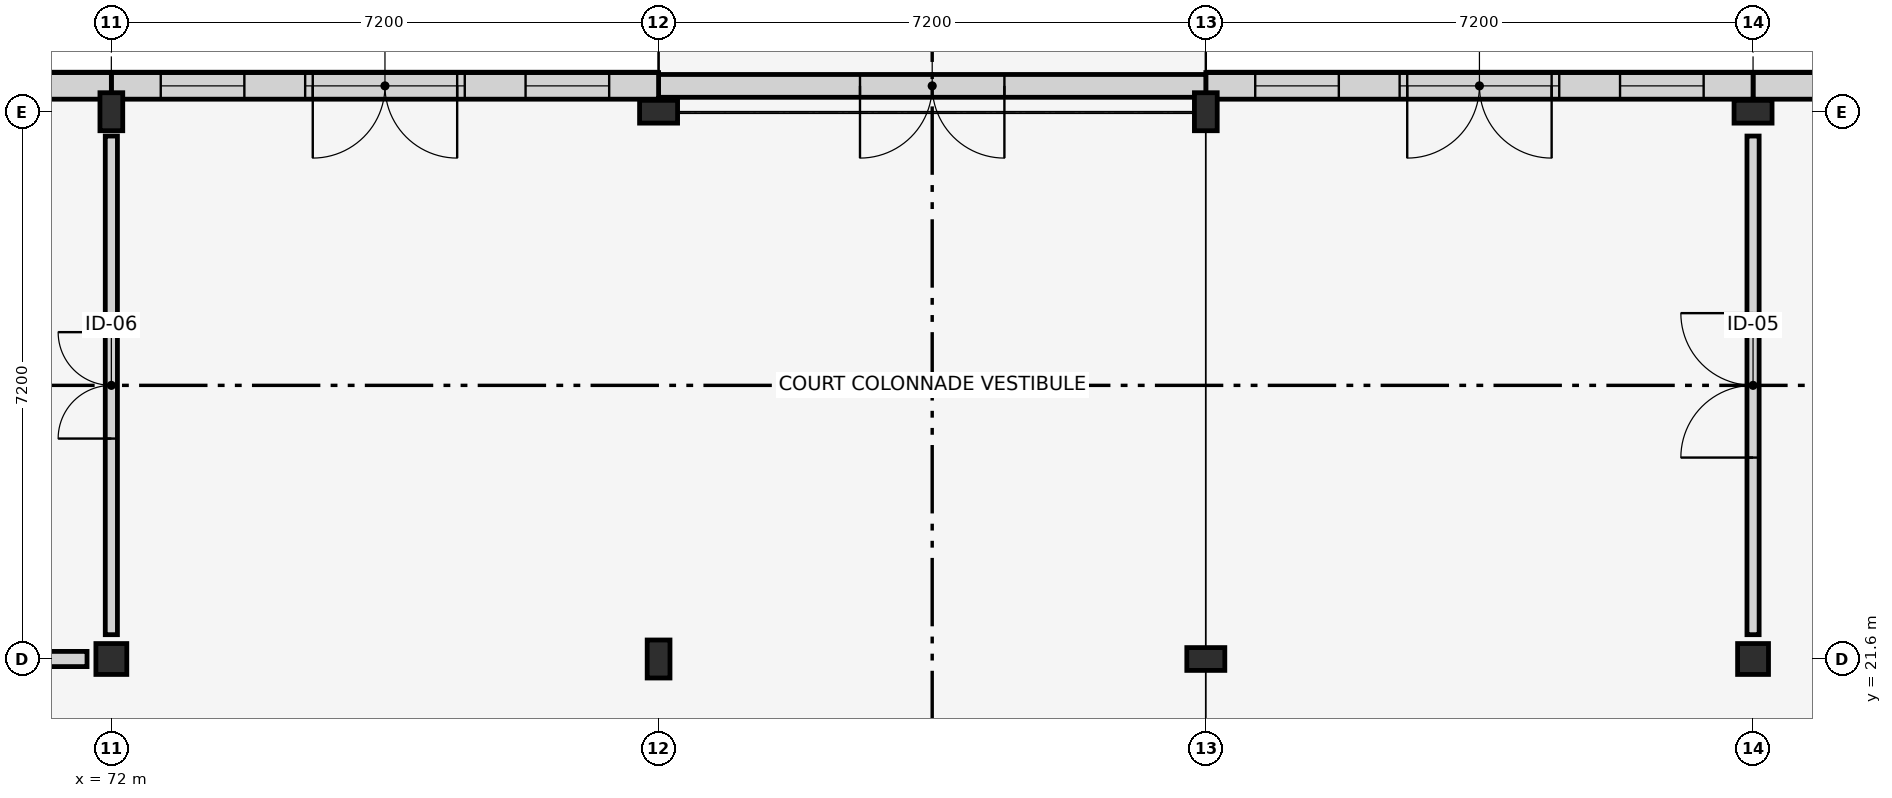
"""IFC4 building model, lengths in metres.
Left out: names, types, materials, properties, quantities, classifications, styles, units other than length and angle.
Written with IfcOpenShell. Run it as: python <this file> out.ifc"""

import sys

from ifc_helpers import new_model, si_unit, direction, frame, frame_2d, origin, origin_2d, place, context, subcontext, project, spatial, rectangle, hollow_circle, i_section, extrude, element, fill, save


model = new_model("IFC4")
c1 = context("Model", 3, precision=1e-05, world=origin(), true_north=direction((0.0, 1.0)))
c2 = subcontext(c1, "Body", "Model", "MODEL_VIEW")
j1 = project(units=[si_unit("LENGTHUNIT", "METRE"), si_unit("PLANEANGLEUNIT", "RADIAN")], contexts=[c1])
p1 = place(None, origin())
s1 = spatial("IfcSite", under=j1, at=p1, CompositionType="ELEMENT")
p2 = place(p1, origin())
s2 = spatial("IfcBuilding", under=s1, at=p2, CompositionType="ELEMENT")
p3 = place(p2, origin())
s3 = spatial("IfcBuildingStorey", under=s2, at=p3, CompositionType="ELEMENT", Elevation=0.0)
p4 = place(p3, frame((72.0, 21.6, 0.0), z_axis=(0.0, 0.0, 1.0), x_axis=(0.0, 1.0, 0.0)))
e1 = element("IfcColumn", 1, at=p4, inside=s3, PredefinedType="COLUMN", context=c2, shape_type="SweptSolid", body=[
    extrude(hollow_circle(Radius=0.203, WallThickness=0.016, at=origin_2d()), origin(), (0.0, 0.0, 1.0), 4.5),
])
for number, where, z_axis, x_axis in (
    (2, (72.0, 28.8, 0.0), (0.0, 0.0, 1.0), (1.0, 0.0, 0.0)),
    (3, (79.2, 21.6, 0.0), (0.0, 0.0, 1.0), (1.0, 0.0, 0.0)),
    (4, (79.2, 28.8, 0.0), (0.0, 0.0, 1.0), (0.0, 1.0, 0.0)),
    (5, (86.4, 21.6, 0.0), (0.0, 0.0, 1.0), (0.0, 1.0, 0.0)),
    (6, (86.4, 28.8, 0.0), (0.0, 0.0, 1.0), (1.0, 0.0, 0.0)),
):
    element("IfcColumn", number, at=place(p3, frame(where, z_axis=z_axis, x_axis=x_axis)), inside=s3, PredefinedType="COLUMN", context=c2, shape_type="SweptSolid", body=[
        extrude(i_section(OverallWidth=0.3, OverallDepth=0.5, WebThickness=0.014, FlangeThickness=0.028, FilletRadius=0.027, at=origin_2d()), origin(), (0.0, 0.0, 1.0), 4.5),
    ])
p5 = place(p3, frame((93.6, 21.6, 0.0), z_axis=(0.0, 0.0, 1.0), x_axis=(1.0, 0.0, 0.0)))
e7 = element("IfcColumn", 7, at=p5, inside=s3, PredefinedType="COLUMN", context=c2, shape_type="SweptSolid", body=[
    extrude(hollow_circle(Radius=0.203, WallThickness=0.016, at=origin_2d()), origin(), (0.0, 0.0, 1.0), 4.5),
])
p6 = place(p3, frame((93.6, 28.8, 0.0), z_axis=(0.0, 0.0, 1.0), x_axis=(0.0, 1.0, 0.0)))
e8 = element("IfcColumn", 8, at=p6, inside=s3, PredefinedType="COLUMN", context=c2, shape_type="SweptSolid", body=[
    extrude(i_section(OverallWidth=0.3, OverallDepth=0.5, WebThickness=0.014, FlangeThickness=0.028, FilletRadius=0.027, at=origin_2d()), origin(), (0.0, 0.0, 1.0), 4.5),
])
p7 = place(p3, frame((100.8, 29.14, 0.0), z_axis=(0.0, 0.0, 1.0), x_axis=(-1.0, 0.0, 0.0)))
e9 = element("IfcWall", 9, at=p7, inside=s3, PredefinedType="STANDARD", context=c2, shape_type="SweptSolid", body=[
    extrude(rectangle(XDim=7.2, YDim=0.35, at=frame_2d((3.6, 0.0))), origin(), (0.0, 0.0, 1.0), 4.5),
])
p8 = place(p7, frame((1.341, 0.0, 0.9)))
e10 = element("IfcOpeningElement", 10, at=p8, cuts=e9, PredefinedType="OPENING", context=c2, shape_type="SweptSolid", body=[
    extrude(rectangle(XDim=1.35, YDim=2.2, at=frame_2d((0.675, 1.1))), frame((0.0, 0.185, 0.0), z_axis=(0.0, -1.0, 0.0), x_axis=(1.0, 0.0, 0.0)), (0.0, 0.0, 1.0), 0.37),
])
p9 = place(p7, frame((4.434, 0.0, 0.9)))
e11 = element("IfcOpeningElement", 11, at=p9, cuts=e9, PredefinedType="OPENING", context=c2, shape_type="SweptSolid", body=[
    extrude(rectangle(XDim=1.5, YDim=2.4, at=frame_2d((0.75, 1.2))), frame((0.0, 0.185, 0.0), z_axis=(0.0, -1.0, 0.0), x_axis=(1.0, 0.0, 0.0)), (0.0, 0.0, 1.0), 0.37),
])
p10 = place(p3, frame((93.6, 29.14, 0.0), z_axis=(0.0, 0.0, 1.0), x_axis=(-1.0, 0.0, 0.0)))
e12 = element("IfcWall", 12, at=p10, inside=s3, PredefinedType="STANDARD", context=c2, shape_type="SweptSolid", body=[
    extrude(rectangle(XDim=7.2, YDim=0.35, at=frame_2d((3.6, 0.0))), origin(), (0.0, 0.0, 1.0), 4.5),
])
p11 = place(p10, frame((2.65, 0.0, 0.0)))
e13 = element("IfcOpeningElement", 13, at=p11, cuts=e12, PredefinedType="OPENING", context=c2, shape_type="SweptSolid", body=[
    extrude(rectangle(XDim=1.9, YDim=2.45, at=frame_2d((0.95, 1.225))), frame((0.0, 0.185, 0.0), z_axis=(0.0, -1.0, 0.0), x_axis=(1.0, 0.0, 0.0)), (0.0, 0.0, 1.0), 0.37),
])
p12 = place(p10, frame((2.55, 0.0, 2.6)))
e14 = element("IfcOpeningElement", 14, at=p12, cuts=e12, PredefinedType="OPENING", context=c2, shape_type="SweptSolid", body=[
    extrude(rectangle(XDim=2.1, YDim=1.15, at=frame_2d((1.05, 0.575))), frame((0.0, 0.185, 0.0), z_axis=(0.0, -1.0, 0.0), x_axis=(1.0, 0.0, 0.0)), (0.0, 0.0, 1.0), 0.37),
])
p13 = place(p10, frame((0.65, 0.0, 0.35)))
e15 = element("IfcOpeningElement", 15, at=p13, cuts=e12, PredefinedType="OPENING", context=c2, shape_type="SweptSolid", body=[
    extrude(rectangle(XDim=1.1, YDim=2.0, at=frame_2d((0.55, 1.0))), frame((0.0, 0.185, 0.0), z_axis=(0.0, -1.0, 0.0), x_axis=(1.0, 0.0, 0.0)), (0.0, 0.0, 1.0), 0.37),
])
p14 = place(p10, frame((5.45, 0.0, 0.35)))
e16 = element("IfcOpeningElement", 16, at=p14, cuts=e12, PredefinedType="OPENING", context=c2, shape_type="SweptSolid", body=[
    extrude(rectangle(XDim=1.1, YDim=2.0, at=frame_2d((0.55, 1.0))), frame((0.0, 0.185, 0.0), z_axis=(0.0, -1.0, 0.0), x_axis=(1.0, 0.0, 0.0)), (0.0, 0.0, 1.0), 0.37),
])
p15 = place(p3, frame((86.4, 29.14, 0.0), z_axis=(0.0, 0.0, 1.0), x_axis=(-1.0, 0.0, 0.0)))
e17 = element("IfcWall", 17, at=p15, inside=s3, PredefinedType="STANDARD", context=c2, shape_type="SweptSolid", body=[
    extrude(rectangle(XDim=7.2, YDim=0.3, at=frame_2d((3.6, 0.0))), origin(), (0.0, 0.0, 1.0), 3.95),
])
p16 = place(p15, frame((2.65, 0.0, 0.0)))
e18 = element("IfcOpeningElement", 18, at=p16, cuts=e17, PredefinedType="OPENING", context=c2, shape_type="SweptSolid", body=[
    extrude(rectangle(XDim=1.9, YDim=2.45, at=frame_2d((0.95, 1.225))), frame((0.0, 0.16, 0.0), z_axis=(0.0, -1.0, 0.0), x_axis=(1.0, 0.0, 0.0)), (0.0, 0.0, 1.0), 0.32),
])
p17 = place(p3, frame((79.2, 29.14, 0.0), z_axis=(0.0, 0.0, 1.0), x_axis=(-1.0, 0.0, 0.0)))
e19 = element("IfcWall", 19, at=p17, inside=s3, PredefinedType="STANDARD", context=c2, shape_type="SweptSolid", body=[
    extrude(rectangle(XDim=7.2, YDim=0.35, at=frame_2d((3.6, 0.0))), origin(), (0.0, 0.0, 1.0), 4.5),
])
p18 = place(p17, frame((2.65, 0.0, 0.0)))
e20 = element("IfcOpeningElement", 20, at=p18, cuts=e19, PredefinedType="OPENING", context=c2, shape_type="SweptSolid", body=[
    extrude(rectangle(XDim=1.9, YDim=2.45, at=frame_2d((0.95, 1.225))), frame((0.0, 0.185, 0.0), z_axis=(0.0, -1.0, 0.0), x_axis=(1.0, 0.0, 0.0)), (0.0, 0.0, 1.0), 0.37),
])
p19 = place(p17, frame((2.55, 0.0, 2.6)))
e21 = element("IfcOpeningElement", 21, at=p19, cuts=e19, PredefinedType="OPENING", context=c2, shape_type="SweptSolid", body=[
    extrude(rectangle(XDim=2.1, YDim=1.15, at=frame_2d((1.05, 0.575))), frame((0.0, 0.185, 0.0), z_axis=(0.0, -1.0, 0.0), x_axis=(1.0, 0.0, 0.0)), (0.0, 0.0, 1.0), 0.37),
])
p20 = place(p17, frame((0.65, 0.0, 0.35)))
e22 = element("IfcOpeningElement", 22, at=p20, cuts=e19, PredefinedType="OPENING", context=c2, shape_type="SweptSolid", body=[
    extrude(rectangle(XDim=1.1, YDim=2.0, at=frame_2d((0.55, 1.0))), frame((0.0, 0.185, 0.0), z_axis=(0.0, -1.0, 0.0), x_axis=(1.0, 0.0, 0.0)), (0.0, 0.0, 1.0), 0.37),
])
p21 = place(p17, frame((5.45, 0.0, 0.35)))
e23 = element("IfcOpeningElement", 23, at=p21, cuts=e19, PredefinedType="OPENING", context=c2, shape_type="SweptSolid", body=[
    extrude(rectangle(XDim=1.1, YDim=2.0, at=frame_2d((0.55, 1.0))), frame((0.0, 0.185, 0.0), z_axis=(0.0, -1.0, 0.0), x_axis=(1.0, 0.0, 0.0)), (0.0, 0.0, 1.0), 0.37),
])
p22 = place(p3, frame((72.0, 29.14, 0.0), z_axis=(0.0, 0.0, 1.0), x_axis=(-1.0, 0.0, 0.0)))
e24 = element("IfcWall", 24, at=p22, inside=s3, PredefinedType="STANDARD", context=c2, shape_type="SweptSolid", body=[
    extrude(rectangle(XDim=7.2, YDim=0.35, at=frame_2d((3.6, 0.0))), origin(), (0.0, 0.0, 1.0), 4.5),
])
p23 = place(p22, frame((1.166, 0.0, 0.9)))
e25 = element("IfcOpeningElement", 25, at=p23, cuts=e24, PredefinedType="OPENING", context=c2, shape_type="SweptSolid", body=[
    extrude(rectangle(XDim=1.7, YDim=2.4, at=frame_2d((0.85, 1.2))), frame((0.0, 0.185, 0.0), z_axis=(0.0, -1.0, 0.0), x_axis=(1.0, 0.0, 0.0)), (0.0, 0.0, 1.0), 0.37),
])
p24 = place(p22, frame((4.709, 0.0, 0.9)))
e26 = element("IfcOpeningElement", 26, at=p24, cuts=e24, PredefinedType="OPENING", context=c2, shape_type="SweptSolid", body=[
    extrude(rectangle(XDim=0.95, YDim=1.9, at=frame_2d((0.475, 0.95))), frame((0.0, 0.185, 0.0), z_axis=(0.0, -1.0, 0.0), x_axis=(1.0, 0.0, 0.0)), (0.0, 0.0, 1.0), 0.37),
])
p25 = place(p3, frame((93.6, 21.92, 0.0), z_axis=(0.0, 0.0, 1.0), x_axis=(0.0, 1.0, 0.0)))
e27 = element("IfcWall", 27, at=p25, inside=s3, PredefinedType="PARTITIONING", context=c2, shape_type="SweptSolid", body=[
    extrude(rectangle(XDim=6.56, YDim=0.16, at=frame_2d((3.28, 0.0))), origin(), (0.0, 0.0, 1.0), 3.45),
])
p26 = place(p25, frame((2.33, 0.0, 0.0)))
e28 = element("IfcOpeningElement", 28, at=p26, cuts=e27, PredefinedType="OPENING", context=c2, shape_type="SweptSolid", body=[
    extrude(rectangle(XDim=1.9, YDim=2.45, at=frame_2d((0.95, 1.225))), frame((0.0, 0.09, 0.0), z_axis=(0.0, -1.0, 0.0), x_axis=(1.0, 0.0, 0.0)), (0.0, 0.0, 1.0), 0.18),
])
p27 = place(p3, frame((72.0, 21.92, 0.0), z_axis=(0.0, 0.0, 1.0), x_axis=(0.0, 1.0, 0.0)))
e29 = element("IfcWall", 29, at=p27, inside=s3, PredefinedType="PARTITIONING", context=c2, shape_type="SweptSolid", body=[
    extrude(rectangle(XDim=6.56, YDim=0.16, at=frame_2d((3.28, 0.0))), origin(), (0.0, 0.0, 1.0), 3.45),
])
p28 = place(p27, frame((2.58, 0.0, 0.0)))
e30 = element("IfcOpeningElement", 30, at=p28, cuts=e29, PredefinedType="OPENING", context=c2, shape_type="SweptSolid", body=[
    extrude(rectangle(XDim=1.4, YDim=2.3, at=frame_2d((0.7, 1.15))), frame((0.0, 0.09, 0.0), z_axis=(0.0, -1.0, 0.0), x_axis=(1.0, 0.0, 0.0)), (0.0, 0.0, 1.0), 0.18),
])
p29 = place(p3, frame((65.12, 21.6, 0.0), z_axis=(0.0, 0.0, 1.0), x_axis=(1.0, 0.0, 0.0)))
e31 = element("IfcWall", 31, at=p29, inside=s3, PredefinedType="PARTITIONING", context=c2, shape_type="SweptSolid", body=[
    extrude(rectangle(XDim=6.56, YDim=0.2, at=frame_2d((3.28, 0.0))), origin(), (0.0, 0.0, 1.0), 3.45),
])
p30 = place(p29, frame((2.53, 0.0, 0.0)))
e32 = element("IfcOpeningElement", 32, at=p30, cuts=e31, PredefinedType="OPENING", context=c2, shape_type="SweptSolid", body=[
    extrude(rectangle(XDim=1.5, YDim=2.25, at=frame_2d((0.75, 1.125))), frame((0.0, 0.11, 0.0), z_axis=(0.0, -1.0, 0.0), x_axis=(1.0, 0.0, 0.0)), (0.0, 0.0, 1.0), 0.22),
])
p31 = place(p11, origin())
e33 = element("IfcDoor", 33, at=p31, inside=s3, OperationType="DOUBLE_DOOR_SINGLE_SWING", PredefinedType="DOOR", context=c2, shape_type="SweptSolid", body=[
    extrude(rectangle(XDim=1.9, YDim=2.45, at=frame_2d((0.95, 1.225))), frame((0.0, 0.025, 0.0), z_axis=(0.0, -1.0, 0.0), x_axis=(1.0, 0.0, 0.0)), (0.0, 0.0, 1.0), 0.05),
])
fill(e13, e33)
p32 = place(p12, origin())
e34 = element("IfcWindow", 34, at=p32, inside=s3, PartitioningType="SINGLE_PANEL", PredefinedType="WINDOW", context=c2, shape_type="SweptSolid", body=[
    extrude(rectangle(XDim=2.1, YDim=1.15, at=frame_2d((1.05, 0.575))), frame((0.0, 0.03, 0.0), z_axis=(0.0, -1.0, 0.0), x_axis=(1.0, 0.0, 0.0)), (0.0, 0.0, 1.0), 0.06),
])
fill(e14, e34)
p33 = place(p13, origin())
e35 = element("IfcWindow", 35, at=p33, inside=s3, PartitioningType="SINGLE_PANEL", PredefinedType="WINDOW", context=c2, shape_type="SweptSolid", body=[
    extrude(rectangle(XDim=1.1, YDim=2.0, at=frame_2d((0.55, 1.0))), frame((0.0, 0.03, 0.0), z_axis=(0.0, -1.0, 0.0), x_axis=(1.0, 0.0, 0.0)), (0.0, 0.0, 1.0), 0.06),
])
fill(e15, e35)
p34 = place(p14, origin())
e36 = element("IfcWindow", 36, at=p34, inside=s3, PartitioningType="SINGLE_PANEL", PredefinedType="WINDOW", context=c2, shape_type="SweptSolid", body=[
    extrude(rectangle(XDim=1.1, YDim=2.0, at=frame_2d((0.55, 1.0))), frame((0.0, 0.03, 0.0), z_axis=(0.0, -1.0, 0.0), x_axis=(1.0, 0.0, 0.0)), (0.0, 0.0, 1.0), 0.06),
])
fill(e16, e36)
p35 = place(p16, origin())
e37 = element("IfcDoor", 37, at=p35, inside=s3, OperationType="DOUBLE_DOOR_SINGLE_SWING", PredefinedType="DOOR", context=c2, shape_type="SweptSolid", body=[
    extrude(rectangle(XDim=1.9, YDim=2.45, at=frame_2d((0.95, 1.225))), frame((0.0, 0.025, 0.0), z_axis=(0.0, -1.0, 0.0), x_axis=(1.0, 0.0, 0.0)), (0.0, 0.0, 1.0), 0.05),
])
fill(e18, e37)
p36 = place(p18, origin())
e38 = element("IfcDoor", 38, at=p36, inside=s3, OperationType="DOUBLE_DOOR_SINGLE_SWING", PredefinedType="DOOR", context=c2, shape_type="SweptSolid", body=[
    extrude(rectangle(XDim=1.9, YDim=2.45, at=frame_2d((0.95, 1.225))), frame((0.0, 0.025, 0.0), z_axis=(0.0, -1.0, 0.0), x_axis=(1.0, 0.0, 0.0)), (0.0, 0.0, 1.0), 0.05),
])
fill(e20, e38)
p37 = place(p19, origin())
e39 = element("IfcWindow", 39, at=p37, inside=s3, PartitioningType="SINGLE_PANEL", PredefinedType="WINDOW", context=c2, shape_type="SweptSolid", body=[
    extrude(rectangle(XDim=2.1, YDim=1.15, at=frame_2d((1.05, 0.575))), frame((0.0, 0.03, 0.0), z_axis=(0.0, -1.0, 0.0), x_axis=(1.0, 0.0, 0.0)), (0.0, 0.0, 1.0), 0.06),
])
fill(e21, e39)
p38 = place(p20, origin())
e40 = element("IfcWindow", 40, at=p38, inside=s3, PartitioningType="SINGLE_PANEL", PredefinedType="WINDOW", context=c2, shape_type="SweptSolid", body=[
    extrude(rectangle(XDim=1.1, YDim=2.0, at=frame_2d((0.55, 1.0))), frame((0.0, 0.03, 0.0), z_axis=(0.0, -1.0, 0.0), x_axis=(1.0, 0.0, 0.0)), (0.0, 0.0, 1.0), 0.06),
])
fill(e22, e40)
p39 = place(p21, origin())
e41 = element("IfcWindow", 41, at=p39, inside=s3, PartitioningType="SINGLE_PANEL", PredefinedType="WINDOW", context=c2, shape_type="SweptSolid", body=[
    extrude(rectangle(XDim=1.1, YDim=2.0, at=frame_2d((0.55, 1.0))), frame((0.0, 0.03, 0.0), z_axis=(0.0, -1.0, 0.0), x_axis=(1.0, 0.0, 0.0)), (0.0, 0.0, 1.0), 0.06),
])
fill(e23, e41)
p40 = place(p26, origin())
e42 = element("IfcDoor", 42, at=p40, inside=s3, OperationType="DOUBLE_DOOR_SINGLE_SWING", PredefinedType="DOOR", context=c2, shape_type="SweptSolid", body=[
    extrude(rectangle(XDim=1.9, YDim=2.45, at=frame_2d((0.95, 1.225))), frame((0.0, 0.025, 0.0), z_axis=(0.0, -1.0, 0.0), x_axis=(1.0, 0.0, 0.0)), (0.0, 0.0, 1.0), 0.05),
])
fill(e28, e42)
p41 = place(p28, origin())
e43 = element("IfcDoor", 43, at=p41, inside=s3, OperationType="DOUBLE_DOOR_SINGLE_SWING", PredefinedType="DOOR", context=c2, shape_type="SweptSolid", body=[
    extrude(rectangle(XDim=1.4, YDim=2.3, at=frame_2d((0.7, 1.15))), frame((0.0, 0.025, 0.0), z_axis=(0.0, -1.0, 0.0), x_axis=(1.0, 0.0, 0.0)), (0.0, 0.0, 1.0), 0.05),
])
fill(e30, e43)
save(model, sys.argv[1])
